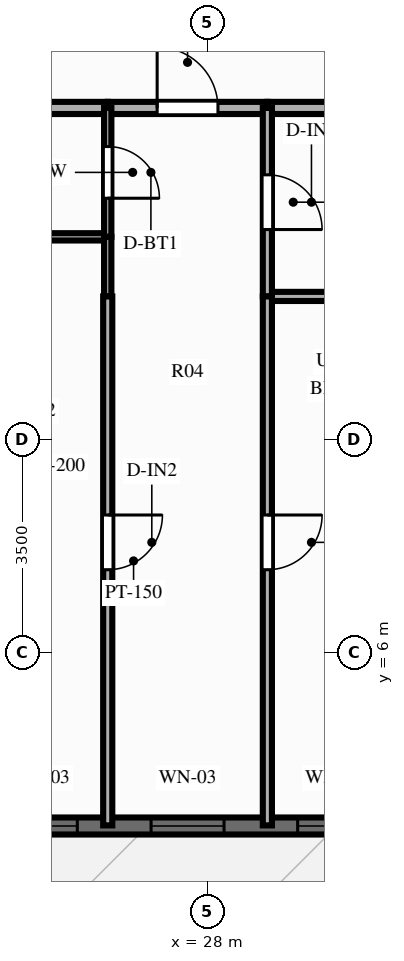
"""IFC4 building model, lengths in metres.
Left out: names, types, materials, properties, quantities, classifications, styles, units other than length and angle.
Written with IfcOpenShell. Run it as: python <this file> out.ifc"""

import sys

from ifc_helpers import new_model, si_unit, direction, frame, frame_2d, origin, place, context, subcontext, project, spatial, rectangle, extrude, source, transform, mapped, element, fill, save


model = new_model("IFC4")
c1 = context("Model", 3, precision=1e-05, world=origin(), true_north=direction((0.0, 1.0)))
c2 = subcontext(c1, "Body", "Model", "MODEL_VIEW")
j1 = project(units=[si_unit("LENGTHUNIT", "METRE"), si_unit("PLANEANGLEUNIT", "RADIAN")], contexts=[c1])
p1 = place(None, origin())
s1 = spatial("IfcSite", under=j1, at=p1, CompositionType="ELEMENT")
p2 = place(p1, origin())
s2 = spatial("IfcBuilding", under=s1, at=p2, CompositionType="ELEMENT")
p3 = place(p2, frame((0.0, 0.0, 83.85)))
s3 = spatial("IfcBuildingStorey", under=s2, at=p3, CompositionType="ELEMENT", Elevation=83.85)
p4 = place(p3, frame((16.2, 3.14, 0.0), z_axis=(0.0, 0.0, 1.0), x_axis=(1.0, 0.0, 0.0)))
e1 = element("IfcWall", 1, at=p4, inside=s3, PredefinedType="SOLIDWALL", context=c2, shape_type="SweptSolid", body=[
    extrude(rectangle(XDim=43.6, YDim=0.28, at=frame_2d((21.8, 0.0))), origin(), (0.0, 0.0, 1.0), 2.28),
])
p5 = place(p4, frame((0.748, 0.0, 0.25)))
e2 = element("IfcOpeningElement", 2, at=p5, cuts=e1, PredefinedType="OPENING", context=c2, shape_type="SweptSolid", body=[
    extrude(rectangle(XDim=1.2, YDim=1.5, at=frame_2d((0.6, 0.75))), frame((0.0, 0.152, 0.0), z_axis=(0.0, -1.0, 0.0), x_axis=(1.0, 0.0, 0.0)), (0.0, 0.0, 1.0), 0.304),
])
p6 = place(p4, frame((3.093, 0.0, 0.25)))
e3 = element("IfcOpeningElement", 3, at=p6, cuts=e1, PredefinedType="OPENING", context=c2, shape_type="SweptSolid", body=[
    extrude(rectangle(XDim=1.2, YDim=1.5, at=frame_2d((0.6, 0.75))), frame((0.0, 0.152, 0.0), z_axis=(0.0, -1.0, 0.0), x_axis=(1.0, 0.0, 0.0)), (0.0, 0.0, 1.0), 0.304),
])
p7 = place(p4, frame((5.885, 0.0, 0.25)))
e4 = element("IfcOpeningElement", 4, at=p7, cuts=e1, PredefinedType="OPENING", context=c2, shape_type="SweptSolid", body=[
    extrude(rectangle(XDim=1.2, YDim=1.5, at=frame_2d((0.6, 0.75))), frame((0.0, 0.152, 0.0), z_axis=(0.0, -1.0, 0.0), x_axis=(1.0, 0.0, 0.0)), (0.0, 0.0, 1.0), 0.304),
])
p8 = place(p4, frame((8.463, 0.0, 0.25)))
e5 = element("IfcOpeningElement", 5, at=p8, cuts=e1, PredefinedType="OPENING", context=c2, shape_type="SweptSolid", body=[
    extrude(rectangle(XDim=1.2, YDim=1.5, at=frame_2d((0.6, 0.75))), frame((0.0, 0.152, 0.0), z_axis=(0.0, -1.0, 0.0), x_axis=(1.0, 0.0, 0.0)), (0.0, 0.0, 1.0), 0.304),
])
p9 = place(p4, frame((10.876, 0.0, 0.25)))
e6 = element("IfcOpeningElement", 6, at=p9, cuts=e1, PredefinedType="OPENING", context=c2, shape_type="SweptSolid", body=[
    extrude(rectangle(XDim=1.2, YDim=1.5, at=frame_2d((0.6, 0.75))), frame((0.0, 0.152, 0.0), z_axis=(0.0, -1.0, 0.0), x_axis=(1.0, 0.0, 0.0)), (0.0, 0.0, 1.0), 0.304),
])
p10 = place(p4, frame((13.287, 0.0, 0.25)))
e7 = element("IfcOpeningElement", 7, at=p10, cuts=e1, PredefinedType="OPENING", context=c2, shape_type="SweptSolid", body=[
    extrude(rectangle(XDim=1.2, YDim=1.5, at=frame_2d((0.6, 0.75))), frame((0.0, 0.152, 0.0), z_axis=(0.0, -1.0, 0.0), x_axis=(1.0, 0.0, 0.0)), (0.0, 0.0, 1.0), 0.304),
])
p11 = place(p4, frame((16.521, 0.0, 0.25)))
e8 = element("IfcOpeningElement", 8, at=p11, cuts=e1, PredefinedType="OPENING", context=c2, shape_type="SweptSolid", body=[
    extrude(rectangle(XDim=1.2, YDim=1.5, at=frame_2d((0.6, 0.75))), frame((0.0, 0.152, 0.0), z_axis=(0.0, -1.0, 0.0), x_axis=(1.0, 0.0, 0.0)), (0.0, 0.0, 1.0), 0.304),
])
p12 = place(p4, frame((22.938, 0.0, 0.0), z_axis=(0.0, 0.0, 1.0), x_axis=(-1.0, 0.0, 0.0)))
e9 = element("IfcOpeningElement", 9, at=p12, cuts=e1, PredefinedType="OPENING", context=c2, shape_type="SweptSolid", body=[
    extrude(rectangle(XDim=1.1, YDim=2.15, at=frame_2d((0.55, 1.075))), frame((0.0, 0.152, 0.0), z_axis=(0.0, -1.0, 0.0), x_axis=(1.0, 0.0, 0.0)), (0.0, 0.0, 1.0), 0.304),
])
p13 = place(p4, frame((26.657, 0.0, 0.25)))
e10 = element("IfcOpeningElement", 10, at=p13, cuts=e1, PredefinedType="OPENING", context=c2, shape_type="SweptSolid", body=[
    extrude(rectangle(XDim=0.95, YDim=1.5, at=frame_2d((0.475, 0.75))), frame((0.0, 0.152, 0.0), z_axis=(0.0, -1.0, 0.0), x_axis=(1.0, 0.0, 0.0)), (0.0, 0.0, 1.0), 0.304),
])
p14 = place(p4, frame((28.965, 0.0, 0.25)))
e11 = element("IfcOpeningElement", 11, at=p14, cuts=e1, PredefinedType="OPENING", context=c2, shape_type="SweptSolid", body=[
    extrude(rectangle(XDim=0.7, YDim=1.5, at=frame_2d((0.35, 0.75))), frame((0.0, 0.152, 0.0), z_axis=(0.0, -1.0, 0.0), x_axis=(1.0, 0.0, 0.0)), (0.0, 0.0, 1.0), 0.304),
])
p15 = place(p4, frame((31.158, 0.0, 0.25)))
e12 = element("IfcOpeningElement", 12, at=p15, cuts=e1, PredefinedType="OPENING", context=c2, shape_type="SweptSolid", body=[
    extrude(rectangle(XDim=1.2, YDim=1.5, at=frame_2d((0.6, 0.75))), frame((0.0, 0.152, 0.0), z_axis=(0.0, -1.0, 0.0), x_axis=(1.0, 0.0, 0.0)), (0.0, 0.0, 1.0), 0.304),
])
p16 = place(p4, frame((35.992, 0.0, 0.25)))
e13 = element("IfcOpeningElement", 13, at=p16, cuts=e1, PredefinedType="OPENING", context=c2, shape_type="SweptSolid", body=[
    extrude(rectangle(XDim=1.2, YDim=1.5, at=frame_2d((0.6, 0.75))), frame((0.0, 0.152, 0.0), z_axis=(0.0, -1.0, 0.0), x_axis=(1.0, 0.0, 0.0)), (0.0, 0.0, 1.0), 0.304),
])
p17 = place(p4, frame((40.885, 0.0, 0.25)))
e14 = element("IfcOpeningElement", 14, at=p17, cuts=e1, PredefinedType="OPENING", context=c2, shape_type="SweptSolid", body=[
    extrude(rectangle(XDim=1.2, YDim=1.5, at=frame_2d((0.6, 0.75))), frame((0.0, 0.152, 0.0), z_axis=(0.0, -1.0, 0.0), x_axis=(1.0, 0.0, 0.0)), (0.0, 0.0, 1.0), 0.304),
])
p18 = place(p3, frame((24.163, 14.95, 0.0), z_axis=(0.0, 0.0, 1.0), x_axis=(1.0, 0.0, 0.0)))
e15 = element("IfcWall", 15, at=p18, inside=s3, PredefinedType="PARTITIONING", context=c2, shape_type="SweptSolid", body=[
    extrude(rectangle(XDim=2.2, YDim=0.2, at=frame_2d((1.1, 0.0))), origin(), (0.0, 0.0, 1.0), 2.79),
])
p19 = place(p3, frame((26.363, 14.95, 0.0), z_axis=(0.0, 0.0, 1.0), x_axis=(1.0, 0.0, 0.0)))
e16 = element("IfcWall", 16, at=p19, inside=s3, PredefinedType="PARTITIONING", context=c2, shape_type="SweptSolid", body=[
    extrude(rectangle(XDim=2.625, YDim=0.2, at=frame_2d((1.313, 0.0))), origin(), (0.0, 0.0, 1.0), 2.79),
])
p20 = place(p19, frame((0.813, 0.0, 0.0)))
e17 = element("IfcOpeningElement", 17, at=p20, cuts=e16, PredefinedType="OPENING", context=c2, shape_type="SweptSolid", body=[
    extrude(rectangle(XDim=1.0, YDim=2.15, at=frame_2d((0.5, 1.075))), frame((0.0, 0.112, 0.0), z_axis=(0.0, -1.0, 0.0), x_axis=(1.0, 0.0, 0.0)), (0.0, 0.0, 1.0), 0.224),
])
p21 = place(p3, frame((28.989, 14.95, 0.0), z_axis=(0.0, 0.0, 1.0), x_axis=(1.0, 0.0, 0.0)))
e18 = element("IfcWall", 18, at=p21, inside=s3, PredefinedType="PARTITIONING", context=c2, shape_type="SweptSolid", body=[
    extrude(rectangle(XDim=2.958, YDim=0.2, at=frame_2d((1.479, 0.0))), origin(), (0.0, 0.0, 1.0), 2.79),
])
p22 = place(p3, frame((24.163, 12.83, 0.0), z_axis=(0.0, 0.0, 1.0), x_axis=(1.0, 0.0, 0.0)))
e19 = element("IfcWall", 19, at=p22, inside=s3, PredefinedType="PARTITIONING", context=c2, shape_type="SweptSolid", body=[
    extrude(rectangle(XDim=2.2, YDim=0.12, at=frame_2d((1.1, 0.0))), origin(), (0.0, 0.0, 1.0), 2.79),
])
p23 = place(p3, frame((28.989, 11.85, 0.0), z_axis=(0.0, 0.0, 1.0), x_axis=(1.0, 0.0, 0.0)))
e20 = element("IfcWall", 20, at=p23, inside=s3, PredefinedType="PARTITIONING", context=c2, shape_type="SweptSolid", body=[
    extrude(rectangle(XDim=2.958, YDim=0.15, at=frame_2d((1.479, 0.0))), origin(), (0.0, 0.0, 1.0), 2.79),
])
p24 = place(p3, frame((26.363, 14.95, 0.0), z_axis=(0.0, 0.0, 1.0), x_axis=(0.0, -1.0, 0.0)))
e21 = element("IfcWall", 21, at=p24, inside=s3, PredefinedType="PARTITIONING", context=c2, shape_type="SweptSolid", body=[
    extrude(rectangle(XDim=2.12, YDim=0.12, at=frame_2d((1.06, 0.0))), origin(), (0.0, 0.0, 1.0), 2.79),
])
p25 = place(p24, frame((0.635, 0.0, 0.0)))
e22 = element("IfcOpeningElement", 22, at=p25, cuts=e21, PredefinedType="OPENING", context=c2, shape_type="SweptSolid", body=[
    extrude(rectangle(XDim=0.85, YDim=2.05, at=frame_2d((0.425, 1.025))), frame((0.0, 0.072, 0.0), z_axis=(0.0, -1.0, 0.0), x_axis=(1.0, 0.0, 0.0)), (0.0, 0.0, 1.0), 0.144),
])
p26 = place(p3, frame((26.363, 12.83, 0.0), z_axis=(0.0, 0.0, 1.0), x_axis=(0.0, -1.0, 0.0)))
e23 = element("IfcWall", 23, at=p26, inside=s3, PredefinedType="PARTITIONING", context=c2, shape_type="SweptSolid", body=[
    extrude(rectangle(XDim=0.98, YDim=0.12, at=frame_2d((0.49, 0.0))), origin(), (0.0, 0.0, 1.0), 2.79),
])
p27 = place(p3, frame((26.363, 11.85, 0.0), z_axis=(0.0, 0.0, 1.0), x_axis=(0.0, -1.0, 0.0)))
e24 = element("IfcWall", 24, at=p27, inside=s3, PredefinedType="PARTITIONING", context=c2, shape_type="SweptSolid", body=[
    extrude(rectangle(XDim=8.7, YDim=0.15, at=frame_2d((4.35, 0.0))), origin(), (0.0, 0.0, 1.0), 2.79),
])
p28 = place(p27, frame((3.595, 0.0, 0.0)))
e25 = element("IfcOpeningElement", 25, at=p28, cuts=e24, PredefinedType="OPENING", context=c2, shape_type="SweptSolid", body=[
    extrude(rectangle(XDim=0.9, YDim=2.1, at=frame_2d((0.45, 1.05))), frame((0.0, 0.087, 0.0), z_axis=(0.0, -1.0, 0.0), x_axis=(1.0, 0.0, 0.0)), (0.0, 0.0, 1.0), 0.174),
])
p29 = place(p3, frame((28.989, 14.95, 0.0), z_axis=(0.0, 0.0, 1.0), x_axis=(0.0, -1.0, 0.0)))
e26 = element("IfcWall", 26, at=p29, inside=s3, PredefinedType="PARTITIONING", context=c2, shape_type="SweptSolid", body=[
    extrude(rectangle(XDim=3.1, YDim=0.15, at=frame_2d((1.55, 0.0))), origin(), (0.0, 0.0, 1.0), 2.79),
])
p30 = place(p29, frame((1.1, 0.0, 0.0)))
e27 = element("IfcOpeningElement", 27, at=p30, cuts=e26, PredefinedType="OPENING", context=c2, shape_type="SweptSolid", body=[
    extrude(rectangle(XDim=0.9, YDim=2.1, at=frame_2d((0.45, 1.05))), frame((0.0, 0.087, 0.0), z_axis=(0.0, -1.0, 0.0), x_axis=(1.0, 0.0, 0.0)), (0.0, 0.0, 1.0), 0.174),
])
p31 = place(p3, frame((28.989, 11.85, 0.0), z_axis=(0.0, 0.0, 1.0), x_axis=(0.0, -1.0, 0.0)))
e28 = element("IfcWall", 28, at=p31, inside=s3, PredefinedType="PARTITIONING", context=c2, shape_type="SweptSolid", body=[
    extrude(rectangle(XDim=8.7, YDim=0.15, at=frame_2d((4.35, 0.0))), origin(), (0.0, 0.0, 1.0), 2.79),
])
p32 = place(p31, frame((3.595, 0.0, 0.0)))
e29 = element("IfcOpeningElement", 29, at=p32, cuts=e28, PredefinedType="OPENING", context=c2, shape_type="SweptSolid", body=[
    extrude(rectangle(XDim=0.9, YDim=2.1, at=frame_2d((0.45, 1.05))), frame((0.0, 0.087, 0.0), z_axis=(0.0, -1.0, 0.0), x_axis=(1.0, 0.0, 0.0)), (0.0, 0.0, 1.0), 0.174),
])
m1 = source(origin(), c2, "Body", "SweptSolid", [
    extrude(rectangle(XDim=1.2, YDim=1.5, at=frame_2d((0.6, 0.75))), frame((0.0, 0.03, 0.0), z_axis=(0.0, -1.0, 0.0), x_axis=(1.0, 0.0, 0.0)), (0.0, 0.0, 1.0), 0.06),
])
p33 = place(p8, origin())
e30 = element("IfcWindow", 30, at=p33, inside=s3, PartitioningType="SINGLE_PANEL", PredefinedType="WINDOW", context=c2, shape_type="MappedRepresentation", body=[
    mapped(m1, transform((0.0, 0.0, 0.0), scale=1.0)),
])
fill(e5, e30)
p34 = place(p9, origin())
e31 = element("IfcWindow", 31, at=p34, inside=s3, PartitioningType="SINGLE_PANEL", PredefinedType="WINDOW", context=c2, shape_type="MappedRepresentation", body=[
    mapped(m1, transform((0.0, 0.0, 0.0), scale=1.0)),
])
fill(e6, e31)
p35 = place(p10, origin())
e32 = element("IfcWindow", 32, at=p35, inside=s3, PartitioningType="SINGLE_PANEL", PredefinedType="WINDOW", context=c2, shape_type="MappedRepresentation", body=[
    mapped(m1, transform((0.0, 0.0, 0.0), scale=1.0)),
])
fill(e7, e32)
m2 = source(origin(), c2, "Body", "SweptSolid", [
    extrude(rectangle(XDim=1.0, YDim=2.15, at=frame_2d((0.5, 1.075))), frame((0.0, 0.025, 0.0), z_axis=(0.0, -1.0, 0.0), x_axis=(1.0, 0.0, 0.0)), (0.0, 0.0, 1.0), 0.05),
])
p36 = place(p20, origin())
e33 = element("IfcDoor", 33, at=p36, inside=s3, OperationType="SINGLE_SWING_LEFT", PredefinedType="DOOR", context=c2, shape_type="MappedRepresentation", body=[
    mapped(m2, transform((0.0, 0.0, 0.0), scale=1.0)),
])
fill(e17, e33)
m3 = source(origin(), c2, "Body", "SweptSolid", [
    extrude(rectangle(XDim=0.85, YDim=2.05, at=frame_2d((0.425, 1.025))), frame((0.0, 0.025, 0.0), z_axis=(0.0, -1.0, 0.0), x_axis=(1.0, 0.0, 0.0)), (0.0, 0.0, 1.0), 0.05),
])
p37 = place(p25, origin())
e34 = element("IfcDoor", 34, at=p37, inside=s3, OperationType="SINGLE_SWING_RIGHT", PredefinedType="DOOR", context=c2, shape_type="MappedRepresentation", body=[
    mapped(m3, transform((0.0, 0.0, 0.0), scale=1.0)),
])
fill(e22, e34)
m4 = source(origin(), c2, "Body", "SweptSolid", [
    extrude(rectangle(XDim=0.9, YDim=2.1, at=frame_2d((0.45, 1.05))), frame((0.0, 0.025, 0.0), z_axis=(0.0, -1.0, 0.0), x_axis=(1.0, 0.0, 0.0)), (0.0, 0.0, 1.0), 0.05),
])
p38 = place(p28, origin())
e35 = element("IfcDoor", 35, at=p38, inside=s3, OperationType="SINGLE_SWING_LEFT", PredefinedType="DOOR", context=c2, shape_type="MappedRepresentation", body=[
    mapped(m4, transform((0.0, 0.0, 0.0), scale=1.0)),
])
fill(e25, e35)
p39 = place(p30, origin())
e36 = element("IfcDoor", 36, at=p39, inside=s3, OperationType="SINGLE_SWING_RIGHT", PredefinedType="DOOR", context=c2, shape_type="MappedRepresentation", body=[
    mapped(m4, transform((0.0, 0.0, 0.0), scale=1.0)),
])
fill(e27, e36)
p40 = place(p32, origin())
e37 = element("IfcDoor", 37, at=p40, inside=s3, OperationType="SINGLE_SWING_LEFT", PredefinedType="DOOR", context=c2, shape_type="MappedRepresentation", body=[
    mapped(m4, transform((0.0, 0.0, 0.0), scale=1.0)),
])
fill(e29, e37)
save(model, sys.argv[1])
